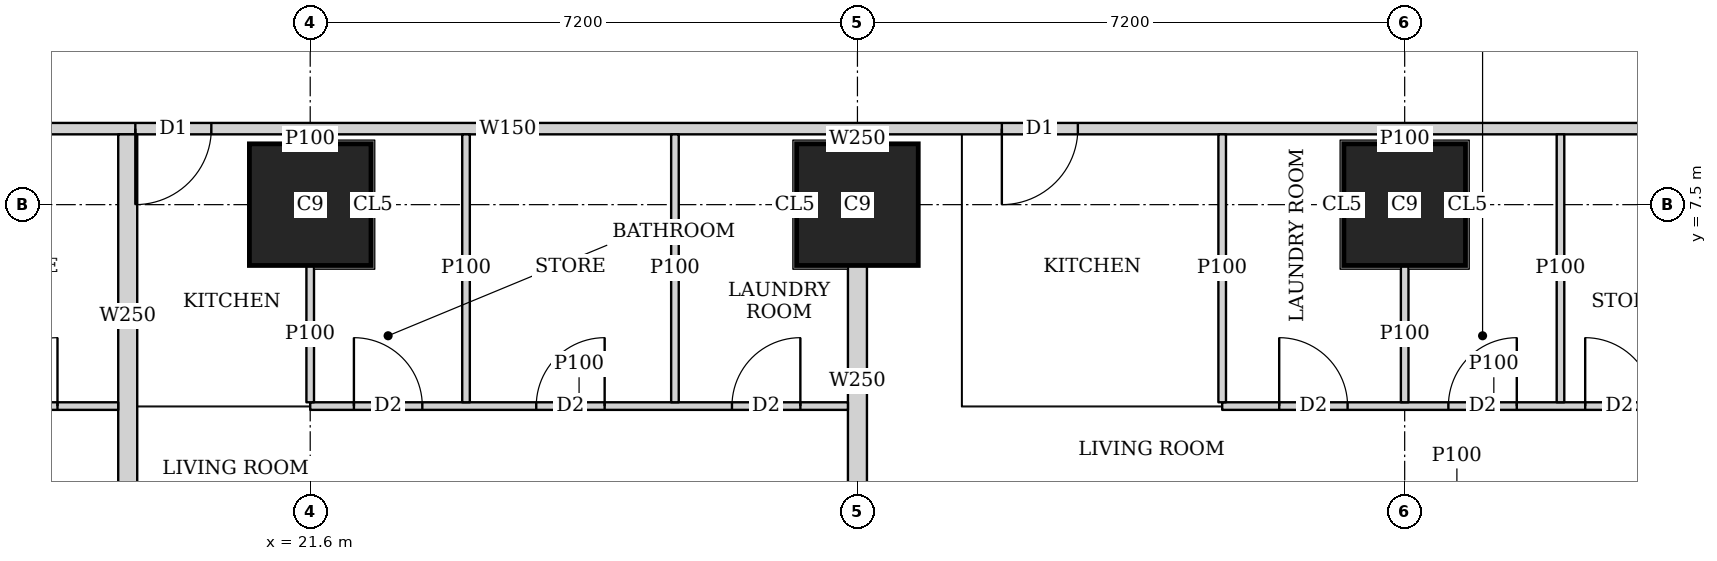
"""IFC4 building model, lengths in metres.
Left out: names, types, materials, properties, quantities, classifications, styles, units other than length and angle.
Written with IfcOpenShell. Run it as: python <this file> out.ifc"""

import sys

from ifc_helpers import new_model, si_unit, direction, frame, frame_2d, origin, origin_2d, place, context, subcontext, project, spatial, rectangle, extrude, element, fill, save


model = new_model("IFC4")
c1 = context("Model", 3, precision=1e-05, world=origin(), true_north=direction((0.0, 1.0)))
c2 = subcontext(c1, "Body", "Model", "MODEL_VIEW")
j1 = project(units=[si_unit("LENGTHUNIT", "METRE"), si_unit("PLANEANGLEUNIT", "RADIAN")], contexts=[c1])
p1 = place(None, origin())
s1 = spatial("IfcSite", under=j1, at=p1, CompositionType="ELEMENT")
p2 = place(p1, origin())
s2 = spatial("IfcBuilding", under=s1, at=p2, CompositionType="ELEMENT")
p3 = place(p2, frame((0.0, 0.0, 111.65)))
s3 = spatial("IfcBuildingStorey", under=s2, at=p3, CompositionType="ELEMENT", Elevation=111.65)
for number, where, z_axis, x_axis in (
    (1, (21.6, 7.5, 0.0), (0.0, 0.0, 1.0), (1.0, 0.0, 0.0)),
    (2, (28.8, 7.5, 0.0), (0.0, 0.0, 1.0), (1.0, 0.0, 0.0)),
    (3, (36.0, 7.5, 0.0), (0.0, 0.0, 1.0), (1.0, 0.0, 0.0)),
):
    element("IfcColumn", number, at=place(p3, frame(where, z_axis=z_axis, x_axis=x_axis)), inside=s3, PredefinedType="COLUMN", context=c2, shape_type="SweptSolid", body=[
        extrude(rectangle(XDim=1.6, YDim=1.6, at=origin_2d()), origin(), (0.0, 0.0, 1.0), 3.75),
    ])
p4 = place(p3, frame((40.053, 8.5, 0.0), z_axis=(0.0, 0.0, 1.0), x_axis=(-1.0, 0.0, 0.0)))
e4 = element("IfcWall", 4, at=p4, inside=s3, PredefinedType="SOLIDWALL", context=c2, shape_type="SweptSolid", body=[
    extrude(rectangle(XDim=31.703, YDim=0.15, at=frame_2d((15.852, 0.0))), origin(), (0.0, 0.0, 1.0), 3.5),
])
p5 = place(p4, frame((28.103, 0.0, 0.0)))
e5 = element("IfcOpeningElement", 5, at=p5, cuts=e4, PredefinedType="OPENING", context=c2, shape_type="SweptSolid", body=[
    extrude(rectangle(XDim=1.0, YDim=2.1, at=frame_2d((0.5, 1.05))), frame((0.0, 0.085, 0.0), z_axis=(0.0, -1.0, 0.0), x_axis=(1.0, 0.0, 0.0)), (0.0, 0.0, 1.0), 0.17),
])
p6 = place(p4, frame((19.754, 0.0, 0.0)))
e6 = element("IfcOpeningElement", 6, at=p6, cuts=e4, PredefinedType="OPENING", context=c2, shape_type="SweptSolid", body=[
    extrude(rectangle(XDim=1.0, YDim=2.1, at=frame_2d((0.5, 1.05))), frame((0.0, 0.085, 0.0), z_axis=(0.0, -1.0, 0.0), x_axis=(1.0, 0.0, 0.0)), (0.0, 0.0, 1.0), 0.17),
])
p7 = place(p4, frame((8.353, 0.0, 0.0)))
e7 = element("IfcOpeningElement", 7, at=p7, cuts=e4, PredefinedType="OPENING", context=c2, shape_type="SweptSolid", body=[
    extrude(rectangle(XDim=1.0, YDim=2.1, at=frame_2d((0.5, 1.05))), frame((0.0, 0.085, 0.0), z_axis=(0.0, -1.0, 0.0), x_axis=(1.0, 0.0, 0.0)), (0.0, 0.0, 1.0), 0.17),
])
p8 = place(p3, frame((33.127, 45.65, 0.0), z_axis=(0.0, 0.0, 1.0), x_axis=(0.185598547723, -0.98262565562, 0.0)))
e8 = element("IfcWall", 8, at=p8, inside=s3, PredefinedType="SOLIDWALL", context=c2, shape_type="SweptSolid", body=[
    extrude(rectangle(XDim=47.118, YDim=0.15, at=frame_2d((23.559, 0.0))), origin(), (0.0, 0.0, 1.0), 2.2),
])
p9 = place(p8, frame((20.373, 0.0, 0.0)))
e9 = element("IfcOpeningElement", 9, at=p9, cuts=e8, PredefinedType="OPENING", context=c2, shape_type="SweptSolid", body=[
    extrude(rectangle(XDim=1.0, YDim=2.1, at=frame_2d((0.5, 1.05))), frame((0.0, 0.085, 0.0), z_axis=(0.0, -1.0, 0.0), x_axis=(1.0, 0.0, 0.0)), (0.0, 0.0, 1.0), 0.17),
])
p10 = place(p8, frame((24.188, 0.0, 0.0)))
e10 = element("IfcOpeningElement", 10, at=p10, cuts=e8, PredefinedType="OPENING", context=c2, shape_type="SweptSolid", body=[
    extrude(rectangle(XDim=1.0, YDim=2.1, at=frame_2d((0.5, 1.05))), frame((0.0, 0.085, 0.0), z_axis=(0.0, -1.0, 0.0), x_axis=(1.0, 0.0, 0.0)), (0.0, 0.0, 1.0), 0.17),
])
p11 = place(p8, frame((32.608, 0.0, 0.0)))
e11 = element("IfcOpeningElement", 11, at=p11, cuts=e8, PredefinedType="OPENING", context=c2, shape_type="SweptSolid", body=[
    extrude(rectangle(XDim=1.0, YDim=2.1, at=frame_2d((0.5, 1.05))), frame((0.0, 0.085, 0.0), z_axis=(0.0, -1.0, 0.0), x_axis=(1.0, 0.0, 0.0)), (0.0, 0.0, 1.0), 0.17),
])
p12 = place(p3, frame((19.074, 4.85, 0.0), z_axis=(0.0, 0.0, 1.0), x_axis=(-1.0, 0.0, 0.0)))
e12 = element("IfcWall", 12, at=p12, inside=s3, PredefinedType="PARTITIONING", context=c2, shape_type="SweptSolid", body=[
    extrude(rectangle(XDim=4.674, YDim=0.1, at=frame_2d((2.337, 0.0))), origin(), (0.0, 0.0, 1.0), 3.5),
])
p13 = place(p12, frame((3.199, 0.0, 0.0)))
e13 = element("IfcOpeningElement", 13, at=p13, cuts=e12, PredefinedType="OPENING", context=c2, shape_type="SweptSolid", body=[
    extrude(rectangle(XDim=0.9, YDim=2.1, at=frame_2d((0.45, 1.05))), frame((0.0, 0.06, 0.0), z_axis=(0.0, -1.0, 0.0), x_axis=(1.0, 0.0, 0.0)), (0.0, 0.0, 1.0), 0.12),
])
p14 = place(p12, frame((0.799, 0.0, 0.0)))
e14 = element("IfcOpeningElement", 14, at=p14, cuts=e12, PredefinedType="OPENING", context=c2, shape_type="SweptSolid", body=[
    extrude(rectangle(XDim=0.9, YDim=2.1, at=frame_2d((0.45, 1.05))), frame((0.0, 0.06, 0.0), z_axis=(0.0, -1.0, 0.0), x_axis=(1.0, 0.0, 0.0)), (0.0, 0.0, 1.0), 0.12),
])
p15 = place(p3, frame((28.675, 4.85, 0.0), z_axis=(0.0, 0.0, 1.0), x_axis=(-1.0, 0.0, 0.0)))
e15 = element("IfcWall", 15, at=p15, inside=s3, PredefinedType="PARTITIONING", context=c2, shape_type="SweptSolid", body=[
    extrude(rectangle(XDim=7.075, YDim=0.1, at=frame_2d((3.538, 0.0))), origin(), (0.0, 0.0, 1.0), 3.5),
])
p16 = place(p15, frame((5.6, 0.0, 0.0)))
e16 = element("IfcOpeningElement", 16, at=p16, cuts=e15, PredefinedType="OPENING", context=c2, shape_type="SweptSolid", body=[
    extrude(rectangle(XDim=0.9, YDim=2.1, at=frame_2d((0.45, 1.05))), frame((0.0, 0.06, 0.0), z_axis=(0.0, -1.0, 0.0), x_axis=(1.0, 0.0, 0.0)), (0.0, 0.0, 1.0), 0.12),
])
p17 = place(p15, frame((0.626, 0.0, 0.0)))
e17 = element("IfcOpeningElement", 17, at=p17, cuts=e15, PredefinedType="OPENING", context=c2, shape_type="SweptSolid", body=[
    extrude(rectangle(XDim=0.9, YDim=2.1, at=frame_2d((0.45, 1.05))), frame((0.0, 0.06, 0.0), z_axis=(0.0, -1.0, 0.0), x_axis=(1.0, 0.0, 0.0)), (0.0, 0.0, 1.0), 0.12),
])
p18 = place(p15, frame((3.201, 0.0, 0.0)))
e18 = element("IfcOpeningElement", 18, at=p18, cuts=e15, PredefinedType="OPENING", context=c2, shape_type="SweptSolid", body=[
    extrude(rectangle(XDim=0.9, YDim=2.1, at=frame_2d((0.45, 1.05))), frame((0.0, 0.06, 0.0), z_axis=(0.0, -1.0, 0.0), x_axis=(1.0, 0.0, 0.0)), (0.0, 0.0, 1.0), 0.12),
])
p19 = place(p3, frame((21.6, 4.9, 0.0), z_axis=(0.0, 0.0, 1.0), x_axis=(0.0, 1.0, 0.0)))
e19 = element("IfcWall", 19, at=p19, inside=s3, PredefinedType="PARTITIONING", context=c2, shape_type="SweptSolid", body=[
    extrude(rectangle(XDim=1.799, YDim=0.1, at=frame_2d((0.899, 0.0))), origin(), (0.0, 0.0, 1.0), 3.5),
])
p20 = place(p3, frame((21.6, 8.301, 0.0), z_axis=(0.0, 0.0, 1.0), x_axis=(0.0, 1.0, 0.0)))
e20 = element("IfcWall", 20, at=p20, inside=s3, PredefinedType="PARTITIONING", context=c2, shape_type="SweptSolid", body=[
    extrude(rectangle(XDim=0.124, YDim=0.1, at=frame_2d((0.062, 0.0))), origin(), (0.0, 0.0, 1.0), 3.5),
])
for number, where, z_axis, x_axis in (
    (21, (26.399, 4.9, 0.0), (0.0, 0.0, 1.0), (0.0, 1.0, 0.0)),
    (22, (23.65, 4.9, 0.0), (0.0, 0.0, 1.0), (0.0, 1.0, 0.0)),
):
    element("IfcWall", number, at=place(p3, frame(where, z_axis=z_axis, x_axis=x_axis)), inside=s3, PredefinedType="PARTITIONING", context=c2, shape_type="SweptSolid", body=[
        extrude(rectangle(XDim=3.525, YDim=0.1, at=frame_2d((1.763, 0.0))), origin(), (0.0, 0.0, 1.0), 3.5),
    ])
p21 = place(p3, frame((19.199, 3.65, 0.0), z_axis=(0.0, 0.0, 1.0), x_axis=(0.0, 1.0, 0.0)))
e23 = element("IfcWall", 23, at=p21, inside=s3, PredefinedType="SOLIDWALL", context=c2, shape_type="SweptSolid", body=[
    extrude(rectangle(XDim=4.775, YDim=0.25, at=frame_2d((2.388, 0.0))), origin(), (0.0, 0.0, 1.0), 3.5),
])
p22 = place(p3, frame((40.747, 4.85, 0.0), z_axis=(0.0, 0.0, 1.0), x_axis=(-1.0, 0.0, 0.0)))
e24 = element("IfcWall", 24, at=p22, inside=s3, PredefinedType="PARTITIONING", context=c2, shape_type="SweptSolid", body=[
    extrude(rectangle(XDim=7.148, YDim=0.1, at=frame_2d((3.574, 0.0))), origin(), (0.0, 0.0, 1.0), 3.5),
])
p23 = place(p22, frame((5.498, 0.0, 0.0)))
e25 = element("IfcOpeningElement", 25, at=p23, cuts=e24, PredefinedType="OPENING", context=c2, shape_type="SweptSolid", body=[
    extrude(rectangle(XDim=0.9, YDim=2.1, at=frame_2d((0.45, 1.05))), frame((0.0, 0.06, 0.0), z_axis=(0.0, -1.0, 0.0), x_axis=(1.0, 0.0, 0.0)), (0.0, 0.0, 1.0), 0.12),
])
p24 = place(p22, frame((3.272, 0.0, 0.0)))
e26 = element("IfcOpeningElement", 26, at=p24, cuts=e24, PredefinedType="OPENING", context=c2, shape_type="SweptSolid", body=[
    extrude(rectangle(XDim=0.9, YDim=2.1, at=frame_2d((0.45, 1.05))), frame((0.0, 0.06, 0.0), z_axis=(0.0, -1.0, 0.0), x_axis=(1.0, 0.0, 0.0)), (0.0, 0.0, 1.0), 0.12),
])
p25 = place(p22, frame((0.15, 0.0, 0.0)))
e27 = element("IfcOpeningElement", 27, at=p25, cuts=e24, PredefinedType="OPENING", context=c2, shape_type="SweptSolid", body=[
    extrude(rectangle(XDim=0.9, YDim=2.1, at=frame_2d((0.45, 1.05))), frame((0.0, 0.06, 0.0), z_axis=(0.0, -1.0, 0.0), x_axis=(1.0, 0.0, 0.0)), (0.0, 0.0, 1.0), 0.12),
])
p26 = place(p22, frame((1.472, 0.0, 0.0)))
e28 = element("IfcOpeningElement", 28, at=p26, cuts=e24, PredefinedType="OPENING", context=c2, shape_type="SweptSolid", body=[
    extrude(rectangle(XDim=0.9, YDim=2.1, at=frame_2d((0.45, 1.05))), frame((0.0, 0.06, 0.0), z_axis=(0.0, -1.0, 0.0), x_axis=(1.0, 0.0, 0.0)), (0.0, 0.0, 1.0), 0.12),
])
p27 = place(p3, frame((33.599, 4.9, 0.0), z_axis=(0.0, 0.0, 1.0), x_axis=(0.0, 1.0, 0.0)))
e29 = element("IfcWall", 29, at=p27, inside=s3, PredefinedType="PARTITIONING", context=c2, shape_type="SweptSolid", body=[
    extrude(rectangle(XDim=3.525, YDim=0.1, at=frame_2d((1.763, 0.0))), origin(), (0.0, 0.0, 1.0), 3.5),
])
p28 = place(p3, frame((36.0, 4.9, 0.0), z_axis=(0.0, 0.0, 1.0), x_axis=(0.0, 1.0, 0.0)))
e30 = element("IfcWall", 30, at=p28, inside=s3, PredefinedType="PARTITIONING", context=c2, shape_type="SweptSolid", body=[
    extrude(rectangle(XDim=1.799, YDim=0.1, at=frame_2d((0.899, 0.0))), origin(), (0.0, 0.0, 1.0), 3.5),
])
p29 = place(p3, frame((36.0, 8.301, 0.0), z_axis=(0.0, 0.0, 1.0), x_axis=(0.0, 1.0, 0.0)))
e31 = element("IfcWall", 31, at=p29, inside=s3, PredefinedType="PARTITIONING", context=c2, shape_type="SweptSolid", body=[
    extrude(rectangle(XDim=0.124, YDim=0.1, at=frame_2d((0.062, 0.0))), origin(), (0.0, 0.0, 1.0), 3.5),
])
p30 = place(p3, frame((38.05, 4.9, 0.0), z_axis=(0.0, 0.0, 1.0), x_axis=(0.0, 1.0, 0.0)))
e32 = element("IfcWall", 32, at=p30, inside=s3, PredefinedType="PARTITIONING", context=c2, shape_type="SweptSolid", body=[
    extrude(rectangle(XDim=3.525, YDim=0.1, at=frame_2d((1.763, 0.0))), origin(), (0.0, 0.0, 1.0), 3.5),
])
p31 = place(p3, frame((28.8, 3.65, 0.0), z_axis=(0.0, 0.0, 1.0), x_axis=(0.0, 1.0, 0.0)))
e33 = element("IfcWall", 33, at=p31, inside=s3, PredefinedType="SOLIDWALL", context=c2, shape_type="SweptSolid", body=[
    extrude(rectangle(XDim=3.049, YDim=0.25, at=frame_2d((1.524, 0.0))), origin(), (0.0, 0.0, 1.0), 3.5),
])
p32 = place(p3, frame((28.8, 8.301, 0.0), z_axis=(0.0, 0.0, 1.0), x_axis=(0.0, 1.0, 0.0)))
e34 = element("IfcWall", 34, at=p32, inside=s3, PredefinedType="SOLIDWALL", context=c2, shape_type="SweptSolid", body=[
    extrude(rectangle(XDim=0.124, YDim=0.25, at=frame_2d((0.062, 0.0))), origin(), (0.0, 0.0, 1.0), 3.5),
])
p33 = place(p14, origin())
e35 = element("IfcDoor", 35, at=p33, inside=s3, OperationType="SINGLE_SWING_RIGHT", PredefinedType="DOOR", context=c2, shape_type="SweptSolid", body=[
    extrude(rectangle(XDim=0.9, YDim=2.1, at=frame_2d((0.45, 1.05))), frame((0.0, 0.025, 0.0), z_axis=(0.0, -1.0, 0.0), x_axis=(1.0, 0.0, 0.0)), (0.0, 0.0, 1.0), 0.05),
])
fill(e14, e35)
p34 = place(p16, origin())
e36 = element("IfcDoor", 36, at=p34, inside=s3, OperationType="SINGLE_SWING_LEFT", PredefinedType="DOOR", context=c2, shape_type="SweptSolid", body=[
    extrude(rectangle(XDim=0.9, YDim=2.1, at=frame_2d((0.45, 1.05))), frame((0.0, 0.025, 0.0), z_axis=(0.0, -1.0, 0.0), x_axis=(1.0, 0.0, 0.0)), (0.0, 0.0, 1.0), 0.05),
])
fill(e16, e36)
p35 = place(p17, origin())
e37 = element("IfcDoor", 37, at=p35, inside=s3, OperationType="SINGLE_SWING_RIGHT", PredefinedType="DOOR", context=c2, shape_type="SweptSolid", body=[
    extrude(rectangle(XDim=0.9, YDim=2.1, at=frame_2d((0.45, 1.05))), frame((0.0, 0.025, 0.0), z_axis=(0.0, -1.0, 0.0), x_axis=(1.0, 0.0, 0.0)), (0.0, 0.0, 1.0), 0.05),
])
fill(e17, e37)
p36 = place(p18, origin())
e38 = element("IfcDoor", 38, at=p36, inside=s3, OperationType="SINGLE_SWING_RIGHT", PredefinedType="DOOR", context=c2, shape_type="SweptSolid", body=[
    extrude(rectangle(XDim=0.9, YDim=2.1, at=frame_2d((0.45, 1.05))), frame((0.0, 0.025, 0.0), z_axis=(0.0, -1.0, 0.0), x_axis=(1.0, 0.0, 0.0)), (0.0, 0.0, 1.0), 0.05),
])
fill(e18, e38)
p37 = place(p6, origin())
e39 = element("IfcDoor", 39, at=p37, inside=s3, OperationType="SINGLE_SWING_RIGHT", PredefinedType="DOOR", context=c2, shape_type="SweptSolid", body=[
    extrude(rectangle(XDim=1.0, YDim=2.1, at=frame_2d((0.5, 1.05))), frame((0.0, 0.025, 0.0), z_axis=(0.0, -1.0, 0.0), x_axis=(1.0, 0.0, 0.0)), (0.0, 0.0, 1.0), 0.05),
])
fill(e6, e39)
p38 = place(p23, origin())
e40 = element("IfcDoor", 40, at=p38, inside=s3, OperationType="SINGLE_SWING_LEFT", PredefinedType="DOOR", context=c2, shape_type="SweptSolid", body=[
    extrude(rectangle(XDim=0.9, YDim=2.1, at=frame_2d((0.45, 1.05))), frame((0.0, 0.025, 0.0), z_axis=(0.0, -1.0, 0.0), x_axis=(1.0, 0.0, 0.0)), (0.0, 0.0, 1.0), 0.05),
])
fill(e25, e40)
p39 = place(p24, origin())
e41 = element("IfcDoor", 41, at=p39, inside=s3, OperationType="SINGLE_SWING_RIGHT", PredefinedType="DOOR", context=c2, shape_type="SweptSolid", body=[
    extrude(rectangle(XDim=0.9, YDim=2.1, at=frame_2d((0.45, 1.05))), frame((0.0, 0.025, 0.0), z_axis=(0.0, -1.0, 0.0), x_axis=(1.0, 0.0, 0.0)), (0.0, 0.0, 1.0), 0.05),
])
fill(e26, e41)
p40 = place(p26, origin())
e42 = element("IfcDoor", 42, at=p40, inside=s3, OperationType="SINGLE_SWING_LEFT", PredefinedType="DOOR", context=c2, shape_type="SweptSolid", body=[
    extrude(rectangle(XDim=0.9, YDim=2.1, at=frame_2d((0.45, 1.05))), frame((0.0, 0.025, 0.0), z_axis=(0.0, -1.0, 0.0), x_axis=(1.0, 0.0, 0.0)), (0.0, 0.0, 1.0), 0.05),
])
fill(e28, e42)
p41 = place(p7, origin())
e43 = element("IfcDoor", 43, at=p41, inside=s3, OperationType="SINGLE_SWING_RIGHT", PredefinedType="DOOR", context=c2, shape_type="SweptSolid", body=[
    extrude(rectangle(XDim=1.0, YDim=2.1, at=frame_2d((0.5, 1.05))), frame((0.0, 0.025, 0.0), z_axis=(0.0, -1.0, 0.0), x_axis=(1.0, 0.0, 0.0)), (0.0, 0.0, 1.0), 0.05),
])
fill(e7, e43)
save(model, sys.argv[1])
